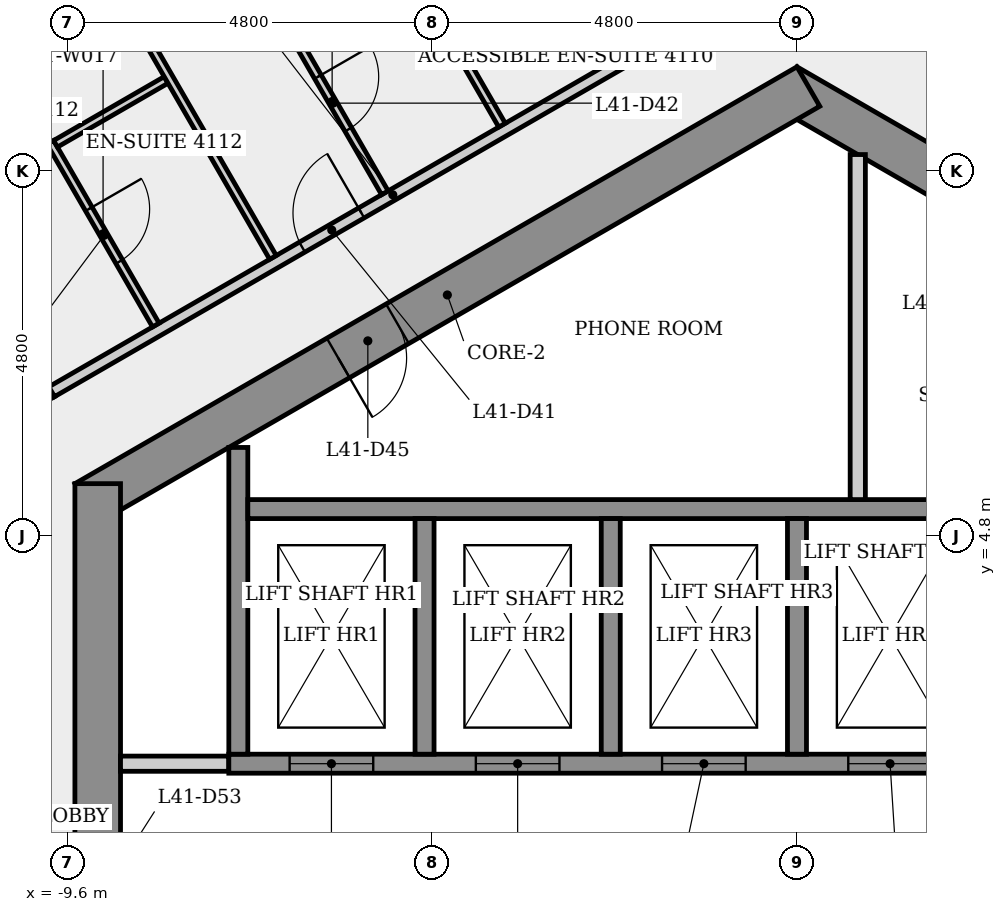
"""IFC4 building model, lengths in metres.
Left out: names, types, materials, properties, quantities, classifications, styles, units other than length and angle.
Written with IfcOpenShell. Run it as: python <this file> out.ifc"""

import sys

from ifc_helpers import new_model, si_unit, direction, frame, frame_2d, origin, place, context, subcontext, project, spatial, rectangle, extrude, element, fill, save


model = new_model("IFC4")
c1 = context("Model", 3, precision=1e-05, world=origin(), true_north=direction((0.0, 1.0)))
c2 = subcontext(c1, "Body", "Model", "MODEL_VIEW")
j1 = project(units=[si_unit("LENGTHUNIT", "METRE"), si_unit("PLANEANGLEUNIT", "RADIAN")], contexts=[c1])
p1 = place(None, origin())
s1 = spatial("IfcSite", under=j1, at=p1, CompositionType="ELEMENT")
p2 = place(p1, origin())
s2 = spatial("IfcBuilding", under=s1, at=p2, CompositionType="ELEMENT")
p3 = place(p2, frame((0.0, 0.0, 156.1)))
s3 = spatial("IfcBuildingStorey", under=s2, at=p3, CompositionType="ELEMENT", Elevation=156.1)
p4 = place(p3, frame((9.35, 5.225, 0.0), z_axis=(0.0, 0.0, 1.0), x_axis=(-0.866023993627, 0.500002442456, 0.0)))
e1 = element("IfcWall", 1, at=p4, inside=s3, PredefinedType="SHEAR", context=c2, shape_type="SweptSolid", body=[
    extrude(rectangle(XDim=10.97, YDim=0.6, at=frame_2d((5.485, 0.0))), origin(), (0.0, 0.0, 1.0), 3.4),
])
p5 = place(p4, frame((7.518, 0.0, 0.0)))
e2 = element("IfcOpeningElement", 2, at=p5, cuts=e1, PredefinedType="OPENING", context=c2, shape_type="SweptSolid", body=[
    extrude(rectangle(XDim=0.9, YDim=2.1, at=frame_2d((0.45, 1.05))), frame((0.0, 0.31, 0.0), z_axis=(0.0, -1.0, 0.0), x_axis=(1.0, 0.0, 0.0)), (0.0, 0.0, 1.0), 0.62),
])
p6 = place(p4, frame((1.172, 0.0, 0.0)))
e3 = element("IfcOpeningElement", 3, at=p6, cuts=e1, PredefinedType="OPENING", context=c2, shape_type="SweptSolid", body=[
    extrude(rectangle(XDim=0.9, YDim=2.1, at=frame_2d((0.45, 1.05))), frame((0.0, 0.31, 0.0), z_axis=(0.0, -1.0, 0.0), x_axis=(1.0, 0.0, 0.0)), (0.0, 0.0, 1.0), 0.62),
])
p7 = place(p3, frame((0.15, 10.71, 0.0), z_axis=(0.0, 0.0, 1.0), x_axis=(-0.866023993627, -0.500002442456, 0.0)))
e4 = element("IfcWall", 4, at=p7, inside=s3, PredefinedType="SHEAR", context=c2, shape_type="SweptSolid", body=[
    extrude(rectangle(XDim=10.97, YDim=0.6, at=frame_2d((5.485, 0.0))), origin(), (0.0, 0.0, 1.0), 3.4),
])
p8 = place(p7, frame((6.243, 0.0, 0.0)))
e5 = element("IfcOpeningElement", 5, at=p8, cuts=e4, PredefinedType="OPENING", context=c2, shape_type="SweptSolid", body=[
    extrude(rectangle(XDim=0.9, YDim=2.1, at=frame_2d((0.45, 1.05))), frame((0.0, 0.31, 0.0), z_axis=(0.0, -1.0, 0.0), x_axis=(1.0, 0.0, 0.0)), (0.0, 0.0, 1.0), 0.62),
])
p9 = place(p3, frame((-9.2, 5.485, 0.0), z_axis=(0.0, 0.0, 1.0), x_axis=(0.0, -1.0, 0.0)))
e6 = element("IfcWall", 6, at=p9, inside=s3, PredefinedType="SHEAR", context=c2, shape_type="SweptSolid", body=[
    extrude(rectangle(XDim=10.97, YDim=0.6, at=frame_2d((5.485, 0.0))), origin(), (0.0, 0.0, 1.0), 3.4),
])
p10 = place(p9, frame((8.516, 0.0, 0.0)))
e7 = element("IfcOpeningElement", 7, at=p10, cuts=e6, PredefinedType="OPENING", context=c2, shape_type="SweptSolid", body=[
    extrude(rectangle(XDim=0.9, YDim=2.1, at=frame_2d((0.45, 1.05))), frame((0.0, 0.31, 0.0), z_axis=(0.0, -1.0, 0.0), x_axis=(1.0, 0.0, 0.0)), (0.0, 0.0, 1.0), 0.62),
])
p11 = place(p9, frame((4.685, 0.0, 0.0)))
e8 = element("IfcOpeningElement", 8, at=p11, cuts=e6, PredefinedType="OPENING", context=c2, shape_type="SweptSolid", body=[
    extrude(rectangle(XDim=1.6, YDim=2.1, at=frame_2d((0.8, 1.05))), frame((0.0, 0.31, 0.0), z_axis=(0.0, -1.0, 0.0), x_axis=(1.0, 0.0, 0.0)), (0.0, 0.0, 1.0), 0.62),
])
p12 = place(p3, frame((-12.388, 11.017, 0.0), z_axis=(0.0, 0.0, 1.0), x_axis=(0.499962338254, -0.866047146712, 0.0)))
e9 = element("IfcWall", 9, at=p12, inside=s3, PredefinedType="PARTITIONING", context=c2, shape_type="SweptSolid", body=[
    extrude(rectangle(XDim=5.11, YDim=0.15, at=frame_2d((2.555, 0.0))), origin(), (0.0, 0.0, 1.0), 3.05),
])
p13 = place(p12, frame((2.067, 0.0, 0.0)))
e10 = element("IfcOpeningElement", 10, at=p13, cuts=e9, PredefinedType="OPENING", context=c2, shape_type="SweptSolid", body=[
    extrude(rectangle(XDim=0.9, YDim=2.1, at=frame_2d((0.45, 1.05))), frame((0.0, 0.085, 0.0), z_axis=(0.0, -1.0, 0.0), x_axis=(1.0, 0.0, 0.0)), (0.0, 0.0, 1.0), 0.17),
])
p14 = place(p3, frame((-9.805, 6.694, 0.0), z_axis=(0.0, 0.0, 1.0), x_axis=(0.866028286753, 0.499995006518, 0.0)))
e11 = element("IfcWall", 11, at=p14, inside=s3, PredefinedType="PARTITIONING", context=c2, shape_type="SweptSolid", body=[
    extrude(rectangle(XDim=10.364, YDim=0.15, at=frame_2d((5.182, 0.0))), origin(), (0.0, 0.0, 1.0), 3.05),
])
p15 = place(p14, frame((3.805, 0.0, 0.0)))
e12 = element("IfcOpeningElement", 12, at=p15, cuts=e11, PredefinedType="OPENING", context=c2, shape_type="SweptSolid", body=[
    extrude(rectangle(XDim=0.9, YDim=2.1, at=frame_2d((0.45, 1.05))), frame((0.0, 0.085, 0.0), z_axis=(0.0, -1.0, 0.0), x_axis=(1.0, 0.0, 0.0)), (0.0, 0.0, 1.0), 0.17),
])
p16 = place(p3, frame((-9.823, 9.975, 0.0), z_axis=(0.0, 0.0, 1.0), x_axis=(0.499971228071, -0.866042014628, 0.0)))
e13 = element("IfcWall", 13, at=p16, inside=s3, PredefinedType="PARTITIONING", context=c2, shape_type="SweptSolid", body=[
    extrude(rectangle(XDim=2.775, YDim=0.1, at=frame_2d((1.388, 0.0))), origin(), (0.0, 0.0, 1.0), 3.05),
])
p17 = place(p16, frame((1.012, 0.0, 0.0)))
e14 = element("IfcOpeningElement", 14, at=p17, cuts=e13, PredefinedType="OPENING", context=c2, shape_type="SweptSolid", body=[
    extrude(rectangle(XDim=0.8, YDim=2.1, at=frame_2d((0.4, 1.05))), frame((0.0, 0.06, 0.0), z_axis=(0.0, -1.0, 0.0), x_axis=(1.0, 0.0, 0.0)), (0.0, 0.0, 1.0), 0.12),
])
p18 = place(p3, frame((-8.9, 1.8, 0.0), z_axis=(0.0, 0.0, 1.0), x_axis=(1.0, 0.0, 0.0)))
e15 = element("IfcWall", 15, at=p18, inside=s3, PredefinedType="PARTITIONING", context=c2, shape_type="SweptSolid", body=[
    extrude(rectangle(XDim=1.425, YDim=0.2, at=frame_2d((0.712, 0.0))), origin(), (0.0, 0.0, 1.0), 3.05),
])
p19 = place(p3, frame((-8.3, 10.796, 0.0), z_axis=(0.0, 0.0, 1.0), x_axis=(-0.866052479261, -0.499953100966, 0.0)))
e16 = element("IfcWall", 16, at=p19, inside=s3, PredefinedType="PARTITIONING", context=c2, shape_type="SweptSolid", body=[
    extrude(rectangle(XDim=1.68, YDim=0.1, at=frame_2d((0.84, 0.0))), origin(), (0.0, 0.0, 1.0), 3.05),
])
p20 = place(p3, frame((-10.6, 14.88, 0.0), z_axis=(0.0, 0.0, 1.0), x_axis=(0.499997136009, -0.866027057304, 0.0)))
e17 = element("IfcWall", 17, at=p20, inside=s3, PredefinedType="PARTITIONING", context=c2, shape_type="SweptSolid", body=[
    extrude(rectangle(XDim=7.412, YDim=0.1, at=frame_2d((3.706, 0.0))), origin(), (0.0, 0.0, 1.0), 3.05),
])
p21 = place(p3, frame((-7.475, 1.8, 0.0), z_axis=(0.0, 0.0, 1.0), x_axis=(1.0, 0.0, 0.0)))
e18 = element("IfcWall", 18, at=p21, inside=s3, PredefinedType="SHEAR", context=c2, shape_type="SweptSolid", body=[
    extrude(rectangle(XDim=14.95, YDim=0.25, at=frame_2d((7.475, 0.0))), origin(), (0.0, 0.0, 1.0), 3.05),
])
p22 = place(p21, frame((0.8, 0.0, 0.0)))
e19 = element("IfcOpeningElement", 19, at=p22, cuts=e18, PredefinedType="OPENING", context=c2, shape_type="SweptSolid", body=[
    extrude(rectangle(XDim=1.1, YDim=2.1, at=frame_2d((0.55, 1.05))), frame((0.0, 0.135, 0.0), z_axis=(0.0, -1.0, 0.0), x_axis=(1.0, 0.0, 0.0)), (0.0, 0.0, 1.0), 0.27),
])
p23 = place(p21, frame((3.25, 0.0, 0.0)))
e20 = element("IfcOpeningElement", 20, at=p23, cuts=e18, PredefinedType="OPENING", context=c2, shape_type="SweptSolid", body=[
    extrude(rectangle(XDim=1.1, YDim=2.1, at=frame_2d((0.55, 1.05))), frame((0.0, 0.135, 0.0), z_axis=(0.0, -1.0, 0.0), x_axis=(1.0, 0.0, 0.0)), (0.0, 0.0, 1.0), 0.27),
])
p24 = place(p21, frame((5.7, 0.0, 0.0)))
e21 = element("IfcOpeningElement", 21, at=p24, cuts=e18, PredefinedType="OPENING", context=c2, shape_type="SweptSolid", body=[
    extrude(rectangle(XDim=1.1, YDim=2.1, at=frame_2d((0.55, 1.05))), frame((0.0, 0.135, 0.0), z_axis=(0.0, -1.0, 0.0), x_axis=(1.0, 0.0, 0.0)), (0.0, 0.0, 1.0), 0.27),
])
p25 = place(p21, frame((8.15, 0.0, 0.0)))
e22 = element("IfcOpeningElement", 22, at=p25, cuts=e18, PredefinedType="OPENING", context=c2, shape_type="SweptSolid", body=[
    extrude(rectangle(XDim=1.1, YDim=2.1, at=frame_2d((0.55, 1.05))), frame((0.0, 0.135, 0.0), z_axis=(0.0, -1.0, 0.0), x_axis=(1.0, 0.0, 0.0)), (0.0, 0.0, 1.0), 0.27),
])
p26 = place(p21, frame((10.6, 0.0, 0.0)))
e23 = element("IfcOpeningElement", 23, at=p26, cuts=e18, PredefinedType="OPENING", context=c2, shape_type="SweptSolid", body=[
    extrude(rectangle(XDim=1.1, YDim=2.1, at=frame_2d((0.55, 1.05))), frame((0.0, 0.135, 0.0), z_axis=(0.0, -1.0, 0.0), x_axis=(1.0, 0.0, 0.0)), (0.0, 0.0, 1.0), 0.27),
])
p27 = place(p21, frame((13.05, 0.0, 0.0)))
e24 = element("IfcOpeningElement", 24, at=p27, cuts=e18, PredefinedType="OPENING", context=c2, shape_type="SweptSolid", body=[
    extrude(rectangle(XDim=1.1, YDim=2.1, at=frame_2d((0.55, 1.05))), frame((0.0, 0.135, 0.0), z_axis=(0.0, -1.0, 0.0), x_axis=(1.0, 0.0, 0.0)), (0.0, 0.0, 1.0), 0.27),
])
p28 = place(p3, frame((-7.35, 1.925, 0.0), z_axis=(0.0, 0.0, 1.0), x_axis=(0.0, 1.0, 0.0)))
e25 = element("IfcWall", 25, at=p28, inside=s3, PredefinedType="SHEAR", context=c2, shape_type="SweptSolid", body=[
    extrude(rectangle(XDim=4.036, YDim=0.25, at=frame_2d((2.018, 0.0))), origin(), (0.0, 0.0, 1.0), 3.05),
])
p29 = place(p3, frame((-7.225, 5.15, 0.0), z_axis=(0.0, 0.0, 1.0), x_axis=(1.0, 0.0, 0.0)))
e26 = element("IfcWall", 26, at=p29, inside=s3, PredefinedType="SHEAR", context=c2, shape_type="SweptSolid", body=[
    extrude(rectangle(XDim=14.7, YDim=0.25, at=frame_2d((7.35, 0.0))), origin(), (0.0, 0.0, 1.0), 3.05),
])
p30 = place(p3, frame((-6.81, 11.715, 0.0), z_axis=(0.0, 0.0, 1.0), x_axis=(0.50000932403, -0.866020020486, 0.0)))
e27 = element("IfcWall", 27, at=p30, inside=s3, PredefinedType="PARTITIONING", context=c2, shape_type="SweptSolid", body=[
    extrude(rectangle(XDim=2.775, YDim=0.1, at=frame_2d((1.387, 0.0))), origin(), (0.0, 0.0, 1.0), 3.05),
])
p31 = place(p30, frame((1.012, 0.0, 0.0)))
e28 = element("IfcOpeningElement", 28, at=p31, cuts=e27, PredefinedType="OPENING", context=c2, shape_type="SweptSolid", body=[
    extrude(rectangle(XDim=0.8, YDim=2.1, at=frame_2d((0.4, 1.05))), frame((0.0, 0.06, 0.0), z_axis=(0.0, -1.0, 0.0), x_axis=(1.0, 0.0, 0.0)), (0.0, 0.0, 1.0), 0.12),
])
p32 = place(p3, frame((-7.586, 16.62, 0.0), z_axis=(0.0, 0.0, 1.0), x_axis=(0.500011399757, -0.866018822032, 0.0)))
e29 = element("IfcWall", 29, at=p32, inside=s3, PredefinedType="PARTITIONING", context=c2, shape_type="SweptSolid", body=[
    extrude(rectangle(XDim=7.411, YDim=0.1, at=frame_2d((3.706, 0.0))), origin(), (0.0, 0.0, 1.0), 3.05),
])
for number, where, z_axis, x_axis in (
    (30, (-4.9, 5.025, 0.0), (0.0, 0.0, 1.0), (0.0, -1.0, 0.0)),
    (31, (-2.45, 5.025, 0.0), (0.0, 0.0, 1.0), (0.0, -1.0, 0.0)),
):
    element("IfcWall", number, at=place(p3, frame(where, z_axis=z_axis, x_axis=x_axis)), inside=s3, PredefinedType="SHEAR", context=c2, shape_type="SweptSolid", body=[
        extrude(rectangle(XDim=3.1, YDim=0.25, at=frame_2d((1.55, 0.0))), origin(), (0.0, 0.0, 1.0), 3.4),
    ])
p33 = place(p3, frame((-2.339, 11.091, 0.0), z_axis=(0.0, 0.0, 1.0), x_axis=(-0.500011588718, 0.866018712932, 0.0)))
e32 = element("IfcWall", 32, at=p33, inside=s3, PredefinedType="PARTITIONING", context=c2, shape_type="SweptSolid", body=[
    extrude(rectangle(XDim=2.875, YDim=0.1, at=frame_2d((1.438, 0.0))), origin(), (0.0, 0.0, 1.0), 3.05),
])
p34 = place(p33, frame((1.038, 0.0, 0.0)))
e33 = element("IfcOpeningElement", 33, at=p34, cuts=e32, PredefinedType="OPENING", context=c2, shape_type="SweptSolid", body=[
    extrude(rectangle(XDim=0.8, YDim=2.1, at=frame_2d((0.4, 1.05))), frame((0.0, 0.06, 0.0), z_axis=(0.0, -1.0, 0.0), x_axis=(1.0, 0.0, 0.0)), (0.0, 0.0, 1.0), 0.12),
])
p35 = place(p3, frame((0.0, 5.025, 0.0), z_axis=(0.0, 0.0, 1.0), x_axis=(0.0, -1.0, 0.0)))
e34 = element("IfcWall", 34, at=p35, inside=s3, PredefinedType="SHEAR", context=c2, shape_type="SweptSolid", body=[
    extrude(rectangle(XDim=3.1, YDim=0.25, at=frame_2d((1.55, 0.0))), origin(), (0.0, 0.0, 1.0), 3.4),
])
p36 = place(p3, frame((0.8, 9.815, 0.0), z_axis=(0.0, 0.0, 1.0), x_axis=(0.0, -1.0, 0.0)))
e35 = element("IfcWall", 35, at=p36, inside=s3, PredefinedType="PARTITIONING", context=c2, shape_type="SweptSolid", body=[
    extrude(rectangle(XDim=4.54, YDim=0.2, at=frame_2d((2.27, 0.0))), origin(), (0.0, 0.0, 1.0), 3.05),
])
p37 = place(p22, origin())
e36 = element("IfcDoor", 36, at=p37, inside=s3, OperationType="SLIDING_TO_LEFT", PredefinedType="DOOR", context=c2, shape_type="SweptSolid", body=[
    extrude(rectangle(XDim=1.1, YDim=2.1, at=frame_2d((0.55, 1.05))), frame((0.0, 0.025, 0.0), z_axis=(0.0, -1.0, 0.0), x_axis=(1.0, 0.0, 0.0)), (0.0, 0.0, 1.0), 0.05),
])
fill(e19, e36)
p38 = place(p23, origin())
e37 = element("IfcDoor", 37, at=p38, inside=s3, OperationType="SLIDING_TO_LEFT", PredefinedType="DOOR", context=c2, shape_type="SweptSolid", body=[
    extrude(rectangle(XDim=1.1, YDim=2.1, at=frame_2d((0.55, 1.05))), frame((0.0, 0.025, 0.0), z_axis=(0.0, -1.0, 0.0), x_axis=(1.0, 0.0, 0.0)), (0.0, 0.0, 1.0), 0.05),
])
fill(e20, e37)
p39 = place(p24, origin())
e38 = element("IfcDoor", 38, at=p39, inside=s3, OperationType="SLIDING_TO_LEFT", PredefinedType="DOOR", context=c2, shape_type="SweptSolid", body=[
    extrude(rectangle(XDim=1.1, YDim=2.1, at=frame_2d((0.55, 1.05))), frame((0.0, 0.025, 0.0), z_axis=(0.0, -1.0, 0.0), x_axis=(1.0, 0.0, 0.0)), (0.0, 0.0, 1.0), 0.05),
])
fill(e21, e38)
p40 = place(p25, origin())
e39 = element("IfcDoor", 39, at=p40, inside=s3, OperationType="SLIDING_TO_LEFT", PredefinedType="DOOR", context=c2, shape_type="SweptSolid", body=[
    extrude(rectangle(XDim=1.1, YDim=2.1, at=frame_2d((0.55, 1.05))), frame((0.0, 0.025, 0.0), z_axis=(0.0, -1.0, 0.0), x_axis=(1.0, 0.0, 0.0)), (0.0, 0.0, 1.0), 0.05),
])
fill(e22, e39)
p41 = place(p15, origin())
e40 = element("IfcDoor", 40, at=p41, inside=s3, OperationType="SINGLE_SWING_RIGHT", PredefinedType="DOOR", context=c2, shape_type="SweptSolid", body=[
    extrude(rectangle(XDim=0.9, YDim=2.1, at=frame_2d((0.45, 1.05))), frame((0.0, 0.025, 0.0), z_axis=(0.0, -1.0, 0.0), x_axis=(1.0, 0.0, 0.0)), (0.0, 0.0, 1.0), 0.05),
])
fill(e12, e40)
p42 = place(p31, origin())
e41 = element("IfcDoor", 41, at=p42, inside=s3, OperationType="SINGLE_SWING_LEFT", PredefinedType="DOOR", context=c2, shape_type="SweptSolid", body=[
    extrude(rectangle(XDim=0.8, YDim=2.1, at=frame_2d((0.4, 1.05))), frame((0.0, 0.025, 0.0), z_axis=(0.0, -1.0, 0.0), x_axis=(1.0, 0.0, 0.0)), (0.0, 0.0, 1.0), 0.05),
])
fill(e28, e41)
p43 = place(p17, origin())
e42 = element("IfcDoor", 42, at=p43, inside=s3, OperationType="SINGLE_SWING_LEFT", PredefinedType="DOOR", context=c2, shape_type="SweptSolid", body=[
    extrude(rectangle(XDim=0.8, YDim=2.1, at=frame_2d((0.4, 1.05))), frame((0.0, 0.025, 0.0), z_axis=(0.0, -1.0, 0.0), x_axis=(1.0, 0.0, 0.0)), (0.0, 0.0, 1.0), 0.05),
])
fill(e14, e42)
p44 = place(p8, origin())
e43 = element("IfcDoor", 43, at=p44, inside=s3, OperationType="SINGLE_SWING_RIGHT", PredefinedType="DOOR", context=c2, shape_type="SweptSolid", body=[
    extrude(rectangle(XDim=0.9, YDim=2.1, at=frame_2d((0.45, 1.05))), frame((0.0, 0.025, 0.0), z_axis=(0.0, -1.0, 0.0), x_axis=(1.0, 0.0, 0.0)), (0.0, 0.0, 1.0), 0.05),
])
fill(e5, e43)
save(model, sys.argv[1])
